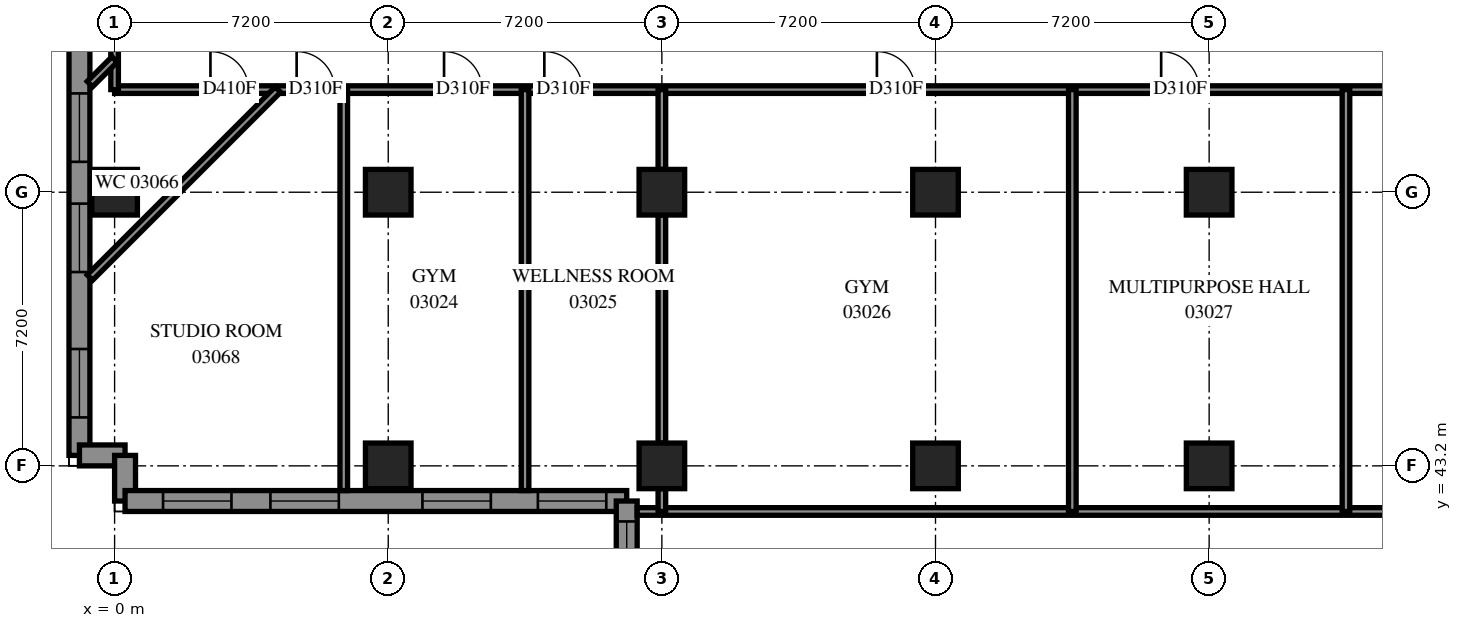
"""IFC4 building model, lengths in metres.
Left out: names, types, materials, properties, quantities, classifications, styles, units other than length and angle.
Written with IfcOpenShell. Run it as: python <this file> out.ifc"""

import sys

from ifc_helpers import new_model, si_unit, direction, frame, frame_2d, origin, origin_2d, place, context, subcontext, project, spatial, polyline, rectangle, outline, extrude, element, fill, save


model = new_model("IFC4")
c1 = context("Model", 3, precision=1e-05, world=origin(), true_north=direction((0.0, 1.0)))
c2 = subcontext(c1, "Body", "Model", "MODEL_VIEW")
j1 = project(units=[si_unit("LENGTHUNIT", "METRE"), si_unit("PLANEANGLEUNIT", "RADIAN")], contexts=[c1])
p1 = place(None, origin())
s1 = spatial("IfcSite", under=j1, at=p1, CompositionType="ELEMENT")
p2 = place(p1, origin())
s2 = spatial("IfcBuilding", under=s1, at=p2, CompositionType="ELEMENT")
p3 = place(p2, frame((0.0, 0.0, 14.4)))
s3 = spatial("IfcBuildingStorey", under=s2, at=p3, CompositionType="ELEMENT", Elevation=14.4)
for number, where, z_axis, x_axis in (
    (1, (0.0, 50.4, 0.0), (0.0, 0.0, 1.0), (1.0, 0.0, 0.0)),
    (2, (7.2, 43.2, 0.0), (0.0, 0.0, 1.0), (1.0, 0.0, 0.0)),
    (3, (7.2, 50.4, 0.0), (0.0, 0.0, 1.0), (1.0, 0.0, 0.0)),
    (4, (14.4, 43.2, 0.0), (0.0, 0.0, 1.0), (1.0, 0.0, 0.0)),
    (5, (14.4, 50.4, 0.0), (0.0, 0.0, 1.0), (1.0, 0.0, 0.0)),
    (6, (21.6, 43.2, 0.0), (0.0, 0.0, 1.0), (1.0, 0.0, 0.0)),
    (7, (21.6, 50.4, 0.0), (0.0, 0.0, 1.0), (1.0, 0.0, 0.0)),
    (8, (28.8, 43.2, 0.0), (0.0, 0.0, 1.0), (1.0, 0.0, 0.0)),
    (9, (28.8, 50.4, 0.0), (0.0, 0.0, 1.0), (1.0, 0.0, 0.0)),
):
    element("IfcColumn", number, at=place(p3, frame(where, z_axis=z_axis, x_axis=x_axis)), inside=s3, PredefinedType="COLUMN", context=c2, shape_type="SweptSolid", body=[
        extrude(rectangle(XDim=1.2, YDim=1.2, at=origin_2d()), origin(), (0.0, 0.0, 1.0), 3.8),
    ])
p4 = place(p3, frame((-0.925, 71.725, 0.0), z_axis=(0.0, 0.0, 1.0), x_axis=(0.0, -1.0, 0.0)))
e10 = element("IfcWall", 10, at=p4, inside=s3, PredefinedType="SOLIDWALL", context=c2, shape_type="SweptSolid", body=[
    extrude(outline(polyline([(-0.275, -0.275), (28.525, -0.275), (27.975, 0.275), (0.275, 0.275), (-0.275, -0.275)])), origin(), (0.0, 0.0, 1.0), 3.8),
])
p5 = place(p4, frame((1.0, 0.0, 0.7)))
e11 = element("IfcOpeningElement", 11, at=p5, cuts=e10, PredefinedType="OPENING", context=c2, shape_type="SweptSolid", body=[
    extrude(rectangle(XDim=1.8, YDim=2.6, at=frame_2d((0.9, 1.3))), frame((0.0, 0.285, 0.0), z_axis=(0.0, -1.0, 0.0), x_axis=(1.0, 0.0, 0.0)), (0.0, 0.0, 1.0), 0.57),
])
p6 = place(p4, frame((4.225, 0.0, 0.7)))
e12 = element("IfcOpeningElement", 12, at=p6, cuts=e10, PredefinedType="OPENING", context=c2, shape_type="SweptSolid", body=[
    extrude(rectangle(XDim=1.8, YDim=2.6, at=frame_2d((0.9, 1.3))), frame((0.0, 0.285, 0.0), z_axis=(0.0, -1.0, 0.0), x_axis=(1.0, 0.0, 0.0)), (0.0, 0.0, 1.0), 0.57),
])
p7 = place(p4, frame((7.675, 0.0, 0.7)))
e13 = element("IfcOpeningElement", 13, at=p7, cuts=e10, PredefinedType="OPENING", context=c2, shape_type="SweptSolid", body=[
    extrude(rectangle(XDim=1.8, YDim=2.6, at=frame_2d((0.9, 1.3))), frame((0.0, 0.285, 0.0), z_axis=(0.0, -1.0, 0.0), x_axis=(1.0, 0.0, 0.0)), (0.0, 0.0, 1.0), 0.57),
])
p8 = place(p4, frame((14.875, 0.0, 0.7)))
e14 = element("IfcOpeningElement", 14, at=p8, cuts=e10, PredefinedType="OPENING", context=c2, shape_type="SweptSolid", body=[
    extrude(rectangle(XDim=1.8, YDim=2.6, at=frame_2d((0.9, 1.3))), frame((0.0, 0.285, 0.0), z_axis=(0.0, -1.0, 0.0), x_axis=(1.0, 0.0, 0.0)), (0.0, 0.0, 1.0), 0.57),
])
p9 = place(p4, frame((18.725, 0.0, 0.7)))
e15 = element("IfcOpeningElement", 15, at=p9, cuts=e10, PredefinedType="OPENING", context=c2, shape_type="SweptSolid", body=[
    extrude(rectangle(XDim=1.8, YDim=2.6, at=frame_2d((0.9, 1.3))), frame((0.0, 0.285, 0.0), z_axis=(0.0, -1.0, 0.0), x_axis=(1.0, 0.0, 0.0)), (0.0, 0.0, 1.0), 0.57),
])
p10 = place(p4, frame((21.625, 0.0, 0.7)))
e16 = element("IfcOpeningElement", 16, at=p10, cuts=e10, PredefinedType="OPENING", context=c2, shape_type="SweptSolid", body=[
    extrude(rectangle(XDim=1.8, YDim=2.6, at=frame_2d((0.9, 1.3))), frame((0.0, 0.285, 0.0), z_axis=(0.0, -1.0, 0.0), x_axis=(1.0, 0.0, 0.0)), (0.0, 0.0, 1.0), 0.57),
])
p11 = place(p4, frame((25.45, 0.0, 0.7)))
e17 = element("IfcOpeningElement", 17, at=p11, cuts=e10, PredefinedType="OPENING", context=c2, shape_type="SweptSolid", body=[
    extrude(rectangle(XDim=1.8, YDim=2.6, at=frame_2d((0.9, 1.3))), frame((0.0, 0.285, 0.0), z_axis=(0.0, -1.0, 0.0), x_axis=(1.0, 0.0, 0.0)), (0.0, 0.0, 1.0), 0.57),
])
p12 = place(p4, frame((11.725, 0.0, 0.45)))
e18 = element("IfcOpeningElement", 18, at=p12, cuts=e10, PredefinedType="OPENING", context=c2, shape_type="SweptSolid", body=[
    extrude(rectangle(XDim=1.3, YDim=2.5, at=frame_2d((0.65, 1.25))), frame((0.0, 0.285, 0.0), z_axis=(0.0, -1.0, 0.0), x_axis=(1.0, 0.0, 0.0)), (0.0, 0.0, 1.0), 0.57),
])
p13 = place(p3, frame((-0.925, 43.475, 0.0), z_axis=(0.0, 0.0, 1.0), x_axis=(1.0, 0.0, 0.0)))
e19 = element("IfcWall", 19, at=p13, inside=s3, PredefinedType="SOLIDWALL", context=c2, shape_type="SweptSolid", body=[
    extrude(outline(polyline([(-0.275, -0.275), (0.925, -0.275), (1.475, 0.275), (0.275, 0.275), (-0.275, -0.275)])), origin(), (0.0, 0.0, 1.0), 3.8),
])
p14 = place(p3, frame((0.275, 43.475, 0.0), z_axis=(0.0, 0.0, 1.0), x_axis=(0.0, -1.0, 0.0)))
e20 = element("IfcWall", 20, at=p14, inside=s3, PredefinedType="SOLIDWALL", context=c2, shape_type="SweptSolid", body=[
    extrude(outline(polyline([(0.275, -0.275), (1.475, -0.275), (0.925, 0.275), (-0.275, 0.275), (0.275, -0.275)])), origin(), (0.0, 0.0, 1.0), 3.8),
])
p15 = place(p3, frame((0.275, 42.275, 0.0), z_axis=(0.0, 0.0, 1.0), x_axis=(1.0, 0.0, 0.0)))
e21 = element("IfcWall", 21, at=p15, inside=s3, PredefinedType="SOLIDWALL", context=c2, shape_type="SweptSolid", body=[
    extrude(outline(polyline([(-0.275, -0.275), (12.925, -0.275), (13.475, 0.275), (0.275, 0.275), (-0.275, -0.275)])), origin(), (0.0, 0.0, 1.0), 3.8),
])
p16 = place(p15, frame((1.0, 0.0, 0.7)))
e22 = element("IfcOpeningElement", 22, at=p16, cuts=e21, PredefinedType="OPENING", context=c2, shape_type="SweptSolid", body=[
    extrude(rectangle(XDim=1.8, YDim=2.6, at=frame_2d((0.9, 1.3))), frame((0.0, 0.285, 0.0), z_axis=(0.0, -1.0, 0.0), x_axis=(1.0, 0.0, 0.0)), (0.0, 0.0, 1.0), 0.57),
])
p17 = place(p15, frame((3.825, 0.0, 0.7)))
e23 = element("IfcOpeningElement", 23, at=p17, cuts=e21, PredefinedType="OPENING", context=c2, shape_type="SweptSolid", body=[
    extrude(rectangle(XDim=1.8, YDim=2.6, at=frame_2d((0.9, 1.3))), frame((0.0, 0.285, 0.0), z_axis=(0.0, -1.0, 0.0), x_axis=(1.0, 0.0, 0.0)), (0.0, 0.0, 1.0), 0.57),
])
p18 = place(p15, frame((7.825, 0.0, 0.7)))
e24 = element("IfcOpeningElement", 24, at=p18, cuts=e21, PredefinedType="OPENING", context=c2, shape_type="SweptSolid", body=[
    extrude(rectangle(XDim=1.8, YDim=2.6, at=frame_2d((0.9, 1.3))), frame((0.0, 0.285, 0.0), z_axis=(0.0, -1.0, 0.0), x_axis=(1.0, 0.0, 0.0)), (0.0, 0.0, 1.0), 0.57),
])
p19 = place(p15, frame((10.863, 0.0, 0.7)))
e25 = element("IfcOpeningElement", 25, at=p19, cuts=e21, PredefinedType="OPENING", context=c2, shape_type="SweptSolid", body=[
    extrude(rectangle(XDim=1.8, YDim=2.6, at=frame_2d((0.9, 1.3))), frame((0.0, 0.285, 0.0), z_axis=(0.0, -1.0, 0.0), x_axis=(1.0, 0.0, 0.0)), (0.0, 0.0, 1.0), 0.57),
])
p20 = place(p3, frame((13.475, 42.275, 0.0), z_axis=(0.0, 0.0, 1.0), x_axis=(0.0, -1.0, 0.0)))
e26 = element("IfcWall", 26, at=p20, inside=s3, PredefinedType="SOLIDWALL", context=c2, shape_type="SweptSolid", body=[
    extrude(outline(polyline([(0.275, -0.275), (14.675, -0.275), (14.125, 0.275), (-0.275, 0.275), (0.275, -0.275)])), origin(), (0.0, 0.0, 1.0), 3.8),
])
p21 = place(p20, frame((0.537, 0.0, 0.7)))
e27 = element("IfcOpeningElement", 27, at=p21, cuts=e26, PredefinedType="OPENING", context=c2, shape_type="SweptSolid", body=[
    extrude(rectangle(XDim=1.8, YDim=2.6, at=frame_2d((0.9, 1.3))), frame((0.0, 0.285, 0.0), z_axis=(0.0, -1.0, 0.0), x_axis=(1.0, 0.0, 0.0)), (0.0, 0.0, 1.0), 0.57),
])
p22 = place(p20, frame((3.575, 0.0, 0.7)))
e28 = element("IfcOpeningElement", 28, at=p22, cuts=e26, PredefinedType="OPENING", context=c2, shape_type="SweptSolid", body=[
    extrude(rectangle(XDim=1.8, YDim=2.6, at=frame_2d((0.9, 1.3))), frame((0.0, 0.285, 0.0), z_axis=(0.0, -1.0, 0.0), x_axis=(1.0, 0.0, 0.0)), (0.0, 0.0, 1.0), 0.57),
])
p23 = place(p20, frame((7.175, 0.0, 0.7)))
e29 = element("IfcOpeningElement", 29, at=p23, cuts=e26, PredefinedType="OPENING", context=c2, shape_type="SweptSolid", body=[
    extrude(rectangle(XDim=1.8, YDim=2.6, at=frame_2d((0.9, 1.3))), frame((0.0, 0.285, 0.0), z_axis=(0.0, -1.0, 0.0), x_axis=(1.0, 0.0, 0.0)), (0.0, 0.0, 1.0), 0.57),
])
p24 = place(p20, frame((10.775, 0.0, 0.7)))
e30 = element("IfcOpeningElement", 30, at=p24, cuts=e26, PredefinedType="OPENING", context=c2, shape_type="SweptSolid", body=[
    extrude(rectangle(XDim=1.8, YDim=2.6, at=frame_2d((0.9, 1.3))), frame((0.0, 0.285, 0.0), z_axis=(0.0, -1.0, 0.0), x_axis=(1.0, 0.0, 0.0)), (0.0, 0.0, 1.0), 0.57),
])
p25 = place(p3, frame((13.75, 42.0, 0.0), z_axis=(0.0, 0.0, 1.0), x_axis=(1.0, 0.0, 0.0)))
e31 = element("IfcWall", 31, at=p25, inside=s3, PredefinedType="PARTITIONING", context=c2, shape_type="SweptSolid", body=[
    extrude(rectangle(XDim=58.9, YDim=0.2, at=frame_2d((29.45, 0.0))), origin(), (0.0, 0.0, 1.0), 3.8),
])
p26 = place(p3, frame((0.0, 53.1, 0.0), z_axis=(0.0, 0.0, 1.0), x_axis=(1.0, 0.0, 0.0)))
e32 = element("IfcWall", 32, at=p26, inside=s3, PredefinedType="PARTITIONING", context=c2, shape_type="SweptSolid", body=[
    extrude(rectangle(XDim=54.8, YDim=0.2, at=frame_2d((27.4, 0.0))), origin(), (0.0, 0.0, 1.0), 3.8),
])
p27 = place(p26, frame((8.669, 0.0, 0.0)))
e33 = element("IfcOpeningElement", 33, at=p27, cuts=e32, PredefinedType="OPENING", context=c2, shape_type="SweptSolid", body=[
    extrude(rectangle(XDim=1.0, YDim=2.1, at=frame_2d((0.5, 1.05))), frame((0.0, 0.11, 0.0), z_axis=(0.0, -1.0, 0.0), x_axis=(1.0, 0.0, 0.0)), (0.0, 0.0, 1.0), 0.22),
])
p28 = place(p26, frame((11.307, 0.0, 0.0)))
e34 = element("IfcOpeningElement", 34, at=p28, cuts=e32, PredefinedType="OPENING", context=c2, shape_type="SweptSolid", body=[
    extrude(rectangle(XDim=1.0, YDim=2.1, at=frame_2d((0.5, 1.05))), frame((0.0, 0.11, 0.0), z_axis=(0.0, -1.0, 0.0), x_axis=(1.0, 0.0, 0.0)), (0.0, 0.0, 1.0), 0.22),
])
p29 = place(p26, frame((20.058, 0.0, 0.0)))
e35 = element("IfcOpeningElement", 35, at=p29, cuts=e32, PredefinedType="OPENING", context=c2, shape_type="SweptSolid", body=[
    extrude(rectangle(XDim=1.0, YDim=2.1, at=frame_2d((0.5, 1.05))), frame((0.0, 0.11, 0.0), z_axis=(0.0, -1.0, 0.0), x_axis=(1.0, 0.0, 0.0)), (0.0, 0.0, 1.0), 0.22),
])
p30 = place(p26, frame((27.538, 0.0, 0.0)))
e36 = element("IfcOpeningElement", 36, at=p30, cuts=e32, PredefinedType="OPENING", context=c2, shape_type="SweptSolid", body=[
    extrude(rectangle(XDim=1.0, YDim=2.1, at=frame_2d((0.5, 1.05))), frame((0.0, 0.11, 0.0), z_axis=(0.0, -1.0, 0.0), x_axis=(1.0, 0.0, 0.0)), (0.0, 0.0, 1.0), 0.22),
])
p31 = place(p26, frame((36.542, 0.0, 0.0)))
e37 = element("IfcOpeningElement", 37, at=p31, cuts=e32, PredefinedType="OPENING", context=c2, shape_type="SweptSolid", body=[
    extrude(rectangle(XDim=1.0, YDim=2.1, at=frame_2d((0.5, 1.05))), frame((0.0, 0.11, 0.0), z_axis=(0.0, -1.0, 0.0), x_axis=(1.0, 0.0, 0.0)), (0.0, 0.0, 1.0), 0.22),
])
p32 = place(p26, frame((48.858, 0.0, 0.0)))
e38 = element("IfcOpeningElement", 38, at=p32, cuts=e32, PredefinedType="OPENING", context=c2, shape_type="SweptSolid", body=[
    extrude(rectangle(XDim=1.0, YDim=2.1, at=frame_2d((0.5, 1.05))), frame((0.0, 0.11, 0.0), z_axis=(0.0, -1.0, 0.0), x_axis=(1.0, 0.0, 0.0)), (0.0, 0.0, 1.0), 0.22),
])
p33 = place(p26, frame((2.522, 0.0, 0.0)))
e39 = element("IfcOpeningElement", 39, at=p33, cuts=e32, PredefinedType="OPENING", context=c2, shape_type="SweptSolid", body=[
    extrude(rectangle(XDim=1.0, YDim=2.1, at=frame_2d((0.5, 1.05))), frame((0.0, 0.11, 0.0), z_axis=(0.0, -1.0, 0.0), x_axis=(1.0, 0.0, 0.0)), (0.0, 0.0, 1.0), 0.22),
])
p34 = place(p26, frame((4.79, 0.0, 0.0)))
e40 = element("IfcOpeningElement", 40, at=p34, cuts=e32, PredefinedType="OPENING", context=c2, shape_type="SweptSolid", body=[
    extrude(rectangle(XDim=1.0, YDim=2.1, at=frame_2d((0.5, 1.05))), frame((0.0, 0.11, 0.0), z_axis=(0.0, -1.0, 0.0), x_axis=(1.0, 0.0, 0.0)), (0.0, 0.0, 1.0), 0.22),
])
for number, where, z_axis, x_axis in (
    (41, (25.2, 42.0, 0.0), (0.0, 0.0, 1.0), (0.0, 1.0, 0.0)),
    (42, (32.4, 42.0, 0.0), (0.0, 0.0, 1.0), (0.0, 1.0, 0.0)),
):
    element("IfcWall", number, at=place(p3, frame(where, z_axis=z_axis, x_axis=x_axis)), inside=s3, PredefinedType="PARTITIONING", context=c2, shape_type="SweptSolid", body=[
        extrude(rectangle(XDim=11.1, YDim=0.2, at=frame_2d((5.55, 0.0))), origin(), (0.0, 0.0, 1.0), 3.8),
    ])
for number, where, z_axis, x_axis in (
    (43, (6.03, 42.55, 0.0), (0.0, 0.0, 1.0), (0.0, 1.0, 0.0)),
    (44, (10.8, 42.55, 0.0), (0.0, 0.0, 1.0), (0.0, 1.0, 0.0)),
):
    element("IfcWall", number, at=place(p3, frame(where, z_axis=z_axis, x_axis=x_axis)), inside=s3, PredefinedType="PARTITIONING", context=c2, shape_type="SweptSolid", body=[
        extrude(rectangle(XDim=10.55, YDim=0.2, at=frame_2d((5.275, 0.0))), origin(), (0.0, 0.0, 1.0), 3.8),
    ])
p35 = place(p3, frame((-0.65, 48.154, 0.0), z_axis=(0.0, 0.0, 1.0), x_axis=(0.707099634, 0.7071139283, 0.0)))
e45 = element("IfcWall", 45, at=p35, inside=s3, PredefinedType="PARTITIONING", context=c2, shape_type="SweptSolid", body=[
    extrude(rectangle(XDim=6.996, YDim=0.2, at=frame_2d((3.498, 0.0))), origin(), (0.0, 0.0, 1.0), 3.8),
])
p36 = place(p3, frame((14.4, 43.8, 0.0), z_axis=(0.0, 0.0, 1.0), x_axis=(0.0, 1.0, 0.0)))
e46 = element("IfcWall", 46, at=p36, inside=s3, PredefinedType="PARTITIONING", context=c2, shape_type="SweptSolid", body=[
    extrude(rectangle(XDim=6.0, YDim=0.2, at=frame_2d((3.0, 0.0))), origin(), (0.0, 0.0, 1.0), 3.8),
])
p37 = place(p3, frame((14.4, 51.0, 0.0), z_axis=(0.0, 0.0, 1.0), x_axis=(0.0, 1.0, 0.0)))
e47 = element("IfcWall", 47, at=p37, inside=s3, PredefinedType="PARTITIONING", context=c2, shape_type="SweptSolid", body=[
    extrude(rectangle(XDim=2.1, YDim=0.2, at=frame_2d((1.05, 0.0))), origin(), (0.0, 0.0, 1.0), 3.8),
])
p38 = place(p3, frame((0.0, 53.1, 0.0), z_axis=(0.0, 0.0, 1.0), x_axis=(0.0, 1.0, 0.0)))
e48 = element("IfcWall", 48, at=p38, inside=s3, PredefinedType="PARTITIONING", context=c2, shape_type="SweptSolid", body=[
    extrude(rectangle(XDim=1.8, YDim=0.2, at=frame_2d((0.9, 0.0))), origin(), (0.0, 0.0, 1.0), 3.2),
])
p39 = place(p3, frame((-0.65, 53.246, 0.0), z_axis=(0.0, 0.0, 1.0), x_axis=(0.7071612431, 0.707052315, 0.0)))
e49 = element("IfcWall", 49, at=p39, inside=s3, PredefinedType="PARTITIONING", context=c2, shape_type="SweptSolid", body=[
    extrude(rectangle(XDim=0.918, YDim=0.2, at=frame_2d((0.459, 0.0))), origin(), (0.0, 0.0, 1.0), 3.8),
])
p40 = place(p3, frame((14.4, 42.0, 0.0), z_axis=(0.0, 0.0, 1.0), x_axis=(0.0, 1.0, 0.0)))
e50 = element("IfcWall", 50, at=p40, inside=s3, PredefinedType="PARTITIONING", context=c2, shape_type="SweptSolid", body=[
    extrude(rectangle(XDim=0.6, YDim=0.2, at=frame_2d((0.3, 0.0))), origin(), (0.0, 0.0, 1.0), 3.2),
])
p41 = place(p9, origin())
e51 = element("IfcWindow", 51, at=p41, inside=s3, PartitioningType="SINGLE_PANEL", PredefinedType="WINDOW", context=c2, shape_type="SweptSolid", body=[
    extrude(rectangle(XDim=1.8, YDim=2.6, at=frame_2d((0.9, 1.3))), frame((0.0, 0.155, 0.0), z_axis=(0.0, -1.0, 0.0), x_axis=(1.0, 0.0, 0.0)), (0.0, 0.0, 1.0), 0.06),
])
fill(e15, e51)
p42 = place(p10, origin())
e52 = element("IfcWindow", 52, at=p42, inside=s3, PartitioningType="SINGLE_PANEL", PredefinedType="WINDOW", context=c2, shape_type="SweptSolid", body=[
    extrude(rectangle(XDim=1.8, YDim=2.6, at=frame_2d((0.9, 1.3))), frame((0.0, 0.155, 0.0), z_axis=(0.0, -1.0, 0.0), x_axis=(1.0, 0.0, 0.0)), (0.0, 0.0, 1.0), 0.06),
])
fill(e16, e52)
p43 = place(p11, origin())
e53 = element("IfcWindow", 53, at=p43, inside=s3, PartitioningType="SINGLE_PANEL", PredefinedType="WINDOW", context=c2, shape_type="SweptSolid", body=[
    extrude(rectangle(XDim=1.8, YDim=2.6, at=frame_2d((0.9, 1.3))), frame((0.0, 0.155, 0.0), z_axis=(0.0, -1.0, 0.0), x_axis=(1.0, 0.0, 0.0)), (0.0, 0.0, 1.0), 0.06),
])
fill(e17, e53)
p44 = place(p16, origin())
e54 = element("IfcWindow", 54, at=p44, inside=s3, PartitioningType="SINGLE_PANEL", PredefinedType="WINDOW", context=c2, shape_type="SweptSolid", body=[
    extrude(rectangle(XDim=1.8, YDim=2.6, at=frame_2d((0.9, 1.3))), frame((0.0, 0.155, 0.0), z_axis=(0.0, -1.0, 0.0), x_axis=(1.0, 0.0, 0.0)), (0.0, 0.0, 1.0), 0.06),
])
fill(e22, e54)
p45 = place(p17, origin())
e55 = element("IfcWindow", 55, at=p45, inside=s3, PartitioningType="SINGLE_PANEL", PredefinedType="WINDOW", context=c2, shape_type="SweptSolid", body=[
    extrude(rectangle(XDim=1.8, YDim=2.6, at=frame_2d((0.9, 1.3))), frame((0.0, 0.155, 0.0), z_axis=(0.0, -1.0, 0.0), x_axis=(1.0, 0.0, 0.0)), (0.0, 0.0, 1.0), 0.06),
])
fill(e23, e55)
p46 = place(p18, origin())
e56 = element("IfcWindow", 56, at=p46, inside=s3, PartitioningType="SINGLE_PANEL", PredefinedType="WINDOW", context=c2, shape_type="SweptSolid", body=[
    extrude(rectangle(XDim=1.8, YDim=2.6, at=frame_2d((0.9, 1.3))), frame((0.0, 0.155, 0.0), z_axis=(0.0, -1.0, 0.0), x_axis=(1.0, 0.0, 0.0)), (0.0, 0.0, 1.0), 0.06),
])
fill(e24, e56)
p47 = place(p19, origin())
e57 = element("IfcWindow", 57, at=p47, inside=s3, PartitioningType="SINGLE_PANEL", PredefinedType="WINDOW", context=c2, shape_type="SweptSolid", body=[
    extrude(rectangle(XDim=1.8, YDim=2.6, at=frame_2d((0.9, 1.3))), frame((0.0, 0.155, 0.0), z_axis=(0.0, -1.0, 0.0), x_axis=(1.0, 0.0, 0.0)), (0.0, 0.0, 1.0), 0.06),
])
fill(e25, e57)
p48 = place(p21, origin())
e58 = element("IfcWindow", 58, at=p48, inside=s3, PartitioningType="SINGLE_PANEL", PredefinedType="WINDOW", context=c2, shape_type="SweptSolid", body=[
    extrude(rectangle(XDim=1.8, YDim=2.6, at=frame_2d((0.9, 1.3))), frame((0.0, 0.155, 0.0), z_axis=(0.0, -1.0, 0.0), x_axis=(1.0, 0.0, 0.0)), (0.0, 0.0, 1.0), 0.06),
])
fill(e27, e58)
p49 = place(p27, origin())
e59 = element("IfcDoor", 59, at=p49, inside=s3, OperationType="SINGLE_SWING_LEFT", PredefinedType="DOOR", context=c2, shape_type="SweptSolid", body=[
    extrude(rectangle(XDim=1.0, YDim=2.1, at=frame_2d((0.5, 1.05))), frame((0.0, 0.025, 0.0), z_axis=(0.0, -1.0, 0.0), x_axis=(1.0, 0.0, 0.0)), (0.0, 0.0, 1.0), 0.05),
])
fill(e33, e59)
p50 = place(p28, origin())
e60 = element("IfcDoor", 60, at=p50, inside=s3, OperationType="SINGLE_SWING_RIGHT", PredefinedType="DOOR", context=c2, shape_type="SweptSolid", body=[
    extrude(rectangle(XDim=1.0, YDim=2.1, at=frame_2d((0.5, 1.05))), frame((0.0, 0.025, 0.0), z_axis=(0.0, -1.0, 0.0), x_axis=(1.0, 0.0, 0.0)), (0.0, 0.0, 1.0), 0.05),
])
fill(e34, e60)
p51 = place(p29, origin())
e61 = element("IfcDoor", 61, at=p51, inside=s3, OperationType="SINGLE_SWING_LEFT", PredefinedType="DOOR", context=c2, shape_type="SweptSolid", body=[
    extrude(rectangle(XDim=1.0, YDim=2.1, at=frame_2d((0.5, 1.05))), frame((0.0, 0.025, 0.0), z_axis=(0.0, -1.0, 0.0), x_axis=(1.0, 0.0, 0.0)), (0.0, 0.0, 1.0), 0.05),
])
fill(e35, e61)
p52 = place(p30, origin())
e62 = element("IfcDoor", 62, at=p52, inside=s3, OperationType="SINGLE_SWING_RIGHT", PredefinedType="DOOR", context=c2, shape_type="SweptSolid", body=[
    extrude(rectangle(XDim=1.0, YDim=2.1, at=frame_2d((0.5, 1.05))), frame((0.0, 0.025, 0.0), z_axis=(0.0, -1.0, 0.0), x_axis=(1.0, 0.0, 0.0)), (0.0, 0.0, 1.0), 0.05),
])
fill(e36, e62)
p53 = place(p33, origin())
e63 = element("IfcDoor", 63, at=p53, inside=s3, OperationType="SINGLE_SWING_RIGHT", PredefinedType="DOOR", context=c2, shape_type="SweptSolid", body=[
    extrude(rectangle(XDim=1.0, YDim=2.1, at=frame_2d((0.5, 1.05))), frame((0.0, 0.025, 0.0), z_axis=(0.0, -1.0, 0.0), x_axis=(1.0, 0.0, 0.0)), (0.0, 0.0, 1.0), 0.05),
])
fill(e39, e63)
p54 = place(p34, origin())
e64 = element("IfcDoor", 64, at=p54, inside=s3, OperationType="SINGLE_SWING_LEFT", PredefinedType="DOOR", context=c2, shape_type="SweptSolid", body=[
    extrude(rectangle(XDim=1.0, YDim=2.1, at=frame_2d((0.5, 1.05))), frame((0.0, 0.025, 0.0), z_axis=(0.0, -1.0, 0.0), x_axis=(1.0, 0.0, 0.0)), (0.0, 0.0, 1.0), 0.05),
])
fill(e40, e64)
save(model, sys.argv[1])
